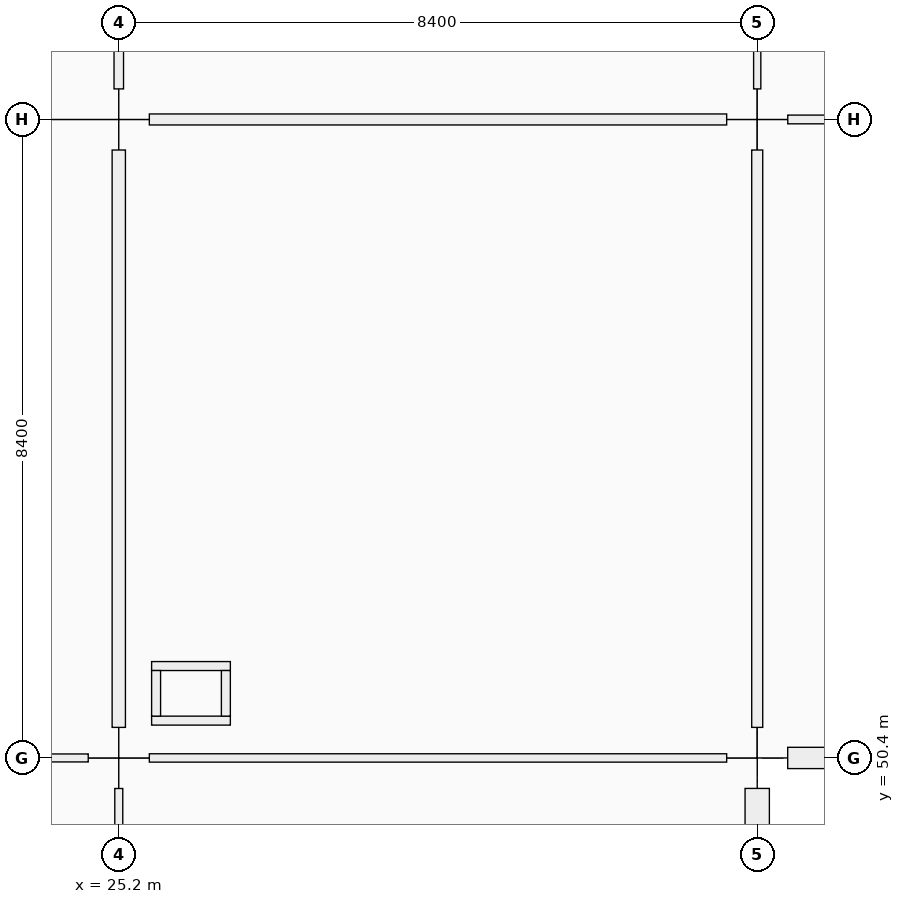
"""IFC4 building model, lengths in metres.
Left out: names, types, materials, properties, quantities, classifications, styles, units other than length and angle.
Written with IfcOpenShell. Run it as: python <this file> out.ifc"""

import sys

from ifc_helpers import new_model, si_unit, direction, frame, frame_2d, origin, origin_2d, place, context, subcontext, project, spatial, rectangle, extrude, element, fill, save


model = new_model("IFC4")
c1 = context("Model", 3, precision=1e-05, world=origin(), true_north=direction((0.0, 1.0)))
c2 = subcontext(c1, "Body", "Model", "MODEL_VIEW")
j1 = project(units=[si_unit("LENGTHUNIT", "METRE"), si_unit("PLANEANGLEUNIT", "RADIAN")], contexts=[c1])
p1 = place(None, origin())
s1 = spatial("IfcSite", under=j1, at=p1, CompositionType="ELEMENT")
p2 = place(p1, origin())
s2 = spatial("IfcBuilding", under=s1, at=p2, CompositionType="ELEMENT")
p3 = place(p2, frame((0.0, 0.0, 5.76)))
s3 = spatial("IfcBuildingStorey", under=s2, at=p3, CompositionType="ELEMENT", Elevation=5.76)
for number, where, z_axis, x_axis in (
    (1, (25.2, 50.4, 0.0), (0.0, 0.0, 1.0), (1.0, 0.0, 0.0)),
    (2, (25.2, 58.8, 0.0), (0.0, 0.0, 1.0), (1.0, 0.0, 0.0)),
    (3, (33.6, 50.4, 0.0), (0.0, 0.0, 1.0), (1.0, 0.0, 0.0)),
    (4, (33.6, 58.8, 0.0), (0.0, 0.0, 1.0), (1.0, 0.0, 0.0)),
):
    element("IfcColumn", number, at=place(p3, frame(where, z_axis=z_axis, x_axis=x_axis)), inside=s3, PredefinedType="COLUMN", context=c2, shape_type="SweptSolid", body=[
        extrude(rectangle(XDim=0.8, YDim=0.8, at=origin_2d()), origin(), (0.0, 0.0, 1.0), 4.5),
    ])
p4 = place(p3, frame((33.6, 49.999, 0.0), z_axis=(0.0, 0.0, 1.0), x_axis=(0.0, -1.0, 0.0)))
e5 = element("IfcWall", 5, at=p4, inside=s3, PredefinedType="SOLIDWALL", context=c2, shape_type="SweptSolid", body=[
    extrude(rectangle(XDim=7.598, YDim=0.32, at=frame_2d((3.799, 0.0))), origin(), (0.0, 0.0, 1.0), 3.4),
])
p5 = place(p4, frame((2.924, 0.0, 0.9)))
e6 = element("IfcOpeningElement", 6, at=p5, cuts=e5, PredefinedType="OPENING", context=c2, shape_type="SweptSolid", body=[
    extrude(rectangle(XDim=1.75, YDim=1.95, at=frame_2d((0.875, 0.975))), frame((0.0, 0.16, 0.0), z_axis=(0.0, -1.0, 0.0), x_axis=(1.0, 0.0, 0.0)), (0.0, 0.0, 1.0), 0.32),
])
p6 = place(p3, frame((41.649, 50.4, 0.0), z_axis=(0.0, 0.0, 1.0), x_axis=(-1.0, 0.0, 0.0)))
e7 = element("IfcWall", 7, at=p6, inside=s3, PredefinedType="SOLIDWALL", context=c2, shape_type="SweptSolid", body=[
    extrude(rectangle(XDim=7.648, YDim=0.28, at=frame_2d((3.824, 0.0))), origin(), (0.0, 0.0, 1.0), 3.4),
])
for number, where, z_axis, x_axis in (
    (8, (25.632, 50.891, 0.0), (0.0, 0.0, 1.0), (1.0, 0.0, 0.0)),
    (9, (25.632, 51.609, 0.0), (0.0, 0.0, 1.0), (1.0, 0.0, 0.0)),
):
    element("IfcWall", number, at=place(p3, frame(where, z_axis=z_axis, x_axis=x_axis)), inside=s3, PredefinedType="PARTITIONING", context=c2, shape_type="SweptSolid", body=[
        extrude(rectangle(XDim=1.036, YDim=0.118, at=frame_2d((0.518, 0.0))), origin(), (0.0, 0.0, 1.0), 3.48),
    ])
for number, where, z_axis, x_axis in (
    (10, (25.691, 50.95, 0.0), (0.0, 0.0, 1.0), (0.0, 1.0, 0.0)),
    (11, (26.609, 50.95, 0.0), (0.0, 0.0, 1.0), (0.0, 1.0, 0.0)),
):
    element("IfcWall", number, at=place(p3, frame(where, z_axis=z_axis, x_axis=x_axis)), inside=s3, PredefinedType="PARTITIONING", context=c2, shape_type="SweptSolid", body=[
        extrude(rectangle(XDim=0.6, YDim=0.118, at=frame_2d((0.3, 0.0))), origin(), (0.0, 0.0, 1.0), 3.48),
    ])
p7 = place(p3, frame((17.202, 50.4, 0.0), z_axis=(0.0, 0.0, 1.0), x_axis=(1.0, 0.0, 0.0)))
e12 = element("IfcWall", 12, at=p7, inside=s3, PredefinedType="PARTITIONING", context=c2, shape_type="SweptSolid", body=[
    extrude(rectangle(XDim=7.596, YDim=0.105, at=frame_2d((3.798, 0.0))), origin(), (0.0, 0.0, 1.0), 2.4),
])
p8 = place(p7, frame((0.583, 0.0, 0.0)))
e13 = element("IfcOpeningElement", 13, at=p8, cuts=e12, PredefinedType="OPENING", context=c2, shape_type="SweptSolid", body=[
    extrude(rectangle(XDim=0.96, YDim=2.1, at=frame_2d((0.48, 1.05))), frame((0.0, 0.052, 0.0), z_axis=(0.0, -1.0, 0.0), x_axis=(1.0, 0.0, 0.0)), (0.0, 0.0, 1.0), 0.105),
])
p9 = place(p7, frame((4.523, 0.0, 0.0)))
e14 = element("IfcOpeningElement", 14, at=p9, cuts=e12, PredefinedType="OPENING", context=c2, shape_type="SweptSolid", body=[
    extrude(rectangle(XDim=0.92, YDim=2.1, at=frame_2d((0.46, 1.05))), frame((0.0, 0.052, 0.0), z_axis=(0.0, -1.0, 0.0), x_axis=(1.0, 0.0, 0.0)), (0.0, 0.0, 1.0), 0.105),
])
p10 = place(p3, frame((25.602, 50.4, 0.0), z_axis=(0.0, 0.0, 1.0), x_axis=(1.0, 0.0, 0.0)))
e15 = element("IfcWall", 15, at=p10, inside=s3, PredefinedType="MOVABLE", context=c2, shape_type="SweptSolid", body=[
    extrude(rectangle(XDim=7.596, YDim=0.11, at=frame_2d((3.798, 0.0))), origin(), (0.0, 0.0, 1.0), 2.4),
])
p11 = place(p10, frame((3.258, 0.0, 0.0)))
e16 = element("IfcOpeningElement", 16, at=p11, cuts=e15, PredefinedType="OPENING", context=c2, shape_type="SweptSolid", body=[
    extrude(rectangle(XDim=1.08, YDim=2.22, at=frame_2d((0.54, 1.11))), frame((0.0, 0.055, 0.0), z_axis=(0.0, -1.0, 0.0), x_axis=(1.0, 0.0, 0.0)), (0.0, 0.0, 1.0), 0.11),
])
p12 = place(p3, frame((25.602, 58.8, 0.0), z_axis=(0.0, 0.0, 1.0), x_axis=(1.0, 0.0, 0.0)))
e17 = element("IfcWall", 17, at=p12, inside=s3, PredefinedType="PARTITIONING", context=c2, shape_type="SweptSolid", body=[
    extrude(rectangle(XDim=7.596, YDim=0.145, at=frame_2d((3.798, 0.0))), origin(), (0.0, 0.0, 1.0), 2.4),
])
p13 = place(p12, frame((3.268, 0.0, 0.0)))
e18 = element("IfcOpeningElement", 18, at=p13, cuts=e17, PredefinedType="OPENING", context=c2, shape_type="SweptSolid", body=[
    extrude(rectangle(XDim=1.06, YDim=2.22, at=frame_2d((0.53, 1.11))), frame((0.0, 0.073, 0.0), z_axis=(0.0, -1.0, 0.0), x_axis=(1.0, 0.0, 0.0)), (0.0, 0.0, 1.0), 0.145),
])
p14 = place(p3, frame((34.002, 58.8, 0.0), z_axis=(0.0, 0.0, 1.0), x_axis=(1.0, 0.0, 0.0)))
e19 = element("IfcWall", 19, at=p14, inside=s3, PredefinedType="PARTITIONING", context=c2, shape_type="SweptSolid", body=[
    extrude(rectangle(XDim=7.621, YDim=0.115, at=frame_2d((3.811, 0.0))), origin(), (0.0, 0.0, 1.0), 2.4),
])
p15 = place(p14, frame((3.28, 0.0, 0.0)))
e20 = element("IfcOpeningElement", 20, at=p15, cuts=e19, PredefinedType="OPENING", context=c2, shape_type="SweptSolid", body=[
    extrude(rectangle(XDim=1.06, YDim=2.22, at=frame_2d((0.53, 1.11))), frame((0.0, 0.058, 0.0), z_axis=(0.0, -1.0, 0.0), x_axis=(1.0, 0.0, 0.0)), (0.0, 0.0, 1.0), 0.115),
])
p16 = place(p3, frame((25.2, 42.402, 0.0), z_axis=(0.0, 0.0, 1.0), x_axis=(0.0, 1.0, 0.0)))
e21 = element("IfcWall", 21, at=p16, inside=s3, PredefinedType="PARTITIONING", context=c2, shape_type="SweptSolid", body=[
    extrude(rectangle(XDim=7.596, YDim=0.105, at=frame_2d((3.798, 0.0))), origin(), (0.0, 0.0, 1.0), 2.4),
])
p17 = place(p3, frame((25.2, 50.802, 0.0), z_axis=(0.0, 0.0, 1.0), x_axis=(0.0, 1.0, 0.0)))
e22 = element("IfcWall", 22, at=p17, inside=s3, PredefinedType="PARTITIONING", context=c2, shape_type="SweptSolid", body=[
    extrude(rectangle(XDim=7.596, YDim=0.175, at=frame_2d((3.798, 0.0))), origin(), (0.0, 0.0, 1.0), 2.4),
])
p18 = place(p17, frame((3.288, 0.0, 0.0)))
e23 = element("IfcOpeningElement", 23, at=p18, cuts=e22, PredefinedType="OPENING", context=c2, shape_type="SweptSolid", body=[
    extrude(rectangle(XDim=1.02, YDim=2.2, at=frame_2d((0.51, 1.1))), frame((0.0, 0.087, 0.0), z_axis=(0.0, -1.0, 0.0), x_axis=(1.0, 0.0, 0.0)), (0.0, 0.0, 1.0), 0.175),
])
p19 = place(p3, frame((25.2, 59.202, 0.0), z_axis=(0.0, 0.0, 1.0), x_axis=(0.0, 1.0, 0.0)))
e24 = element("IfcWall", 24, at=p19, inside=s3, PredefinedType="PARTITIONING", context=c2, shape_type="SweptSolid", body=[
    extrude(rectangle(XDim=7.596, YDim=0.125, at=frame_2d((3.798, 0.0))), origin(), (0.0, 0.0, 1.0), 2.4),
])
p20 = place(p19, frame((3.298, 0.0, 0.0)))
e25 = element("IfcOpeningElement", 25, at=p20, cuts=e24, PredefinedType="OPENING", context=c2, shape_type="SweptSolid", body=[
    extrude(rectangle(XDim=1.0, YDim=2.2, at=frame_2d((0.5, 1.1))), frame((0.0, 0.062, 0.0), z_axis=(0.0, -1.0, 0.0), x_axis=(1.0, 0.0, 0.0)), (0.0, 0.0, 1.0), 0.125),
])
p21 = place(p3, frame((33.6, 50.802, 0.0), z_axis=(0.0, 0.0, 1.0), x_axis=(0.0, 1.0, 0.0)))
e26 = element("IfcWall", 26, at=p21, inside=s3, PredefinedType="PARTITIONING", context=c2, shape_type="SweptSolid", body=[
    extrude(rectangle(XDim=7.596, YDim=0.145, at=frame_2d((3.798, 0.0))), origin(), (0.0, 0.0, 1.0), 2.4),
])
p22 = place(p21, frame((3.318, 0.0, 0.0)))
e27 = element("IfcOpeningElement", 27, at=p22, cuts=e26, PredefinedType="OPENING", context=c2, shape_type="SweptSolid", body=[
    extrude(rectangle(XDim=0.96, YDim=2.18, at=frame_2d((0.48, 1.09))), frame((0.0, 0.073, 0.0), z_axis=(0.0, -1.0, 0.0), x_axis=(1.0, 0.0, 0.0)), (0.0, 0.0, 1.0), 0.145),
])
p23 = place(p3, frame((33.6, 59.202, 0.0), z_axis=(0.0, 0.0, 1.0), x_axis=(0.0, 1.0, 0.0)))
e28 = element("IfcWall", 28, at=p23, inside=s3, PredefinedType="PARTITIONING", context=c2, shape_type="SweptSolid", body=[
    extrude(rectangle(XDim=7.596, YDim=0.095, at=frame_2d((3.798, 0.0))), origin(), (0.0, 0.0, 1.0), 2.4),
])
p24 = place(p23, frame((3.308, 0.0, 0.0)))
e29 = element("IfcOpeningElement", 29, at=p24, cuts=e28, PredefinedType="OPENING", context=c2, shape_type="SweptSolid", body=[
    extrude(rectangle(XDim=0.98, YDim=2.18, at=frame_2d((0.49, 1.09))), frame((0.0, 0.047, 0.0), z_axis=(0.0, -1.0, 0.0), x_axis=(1.0, 0.0, 0.0)), (0.0, 0.0, 1.0), 0.095),
])
p25 = place(p18, origin())
e30 = element("IfcDoor", 30, at=p25, inside=s3, OperationType="SINGLE_SWING_LEFT", PredefinedType="DOOR", context=c2, shape_type="SweptSolid", body=[
    extrude(rectangle(XDim=1.02, YDim=2.2, at=frame_2d((0.51, 1.1))), frame((0.0, 0.025, 0.0), z_axis=(0.0, -1.0, 0.0), x_axis=(1.0, 0.0, 0.0)), (0.0, 0.0, 1.0), 0.05),
])
fill(e23, e30)
p26 = place(p22, origin())
e31 = element("IfcDoor", 31, at=p26, inside=s3, OperationType="SINGLE_SWING_RIGHT", PredefinedType="DOOR", context=c2, shape_type="SweptSolid", body=[
    extrude(rectangle(XDim=0.96, YDim=2.18, at=frame_2d((0.48, 1.09))), frame((0.0, 0.025, 0.0), z_axis=(0.0, -1.0, 0.0), x_axis=(1.0, 0.0, 0.0)), (0.0, 0.0, 1.0), 0.05),
])
fill(e27, e31)
p27 = place(p11, origin())
e32 = element("IfcDoor", 32, at=p27, inside=s3, OperationType="SINGLE_SWING_LEFT", PredefinedType="DOOR", context=c2, shape_type="SweptSolid", body=[
    extrude(rectangle(XDim=1.08, YDim=2.22, at=frame_2d((0.54, 1.11))), frame((0.0, 0.025, 0.0), z_axis=(0.0, -1.0, 0.0), x_axis=(1.0, 0.0, 0.0)), (0.0, 0.0, 1.0), 0.05),
])
fill(e16, e32)
p28 = place(p13, origin())
e33 = element("IfcDoor", 33, at=p28, inside=s3, OperationType="SINGLE_SWING_RIGHT", PredefinedType="DOOR", context=c2, shape_type="SweptSolid", body=[
    extrude(rectangle(XDim=1.06, YDim=2.22, at=frame_2d((0.53, 1.11))), frame((0.0, 0.025, 0.0), z_axis=(0.0, -1.0, 0.0), x_axis=(1.0, 0.0, 0.0)), (0.0, 0.0, 1.0), 0.05),
])
fill(e18, e33)
save(model, sys.argv[1])
